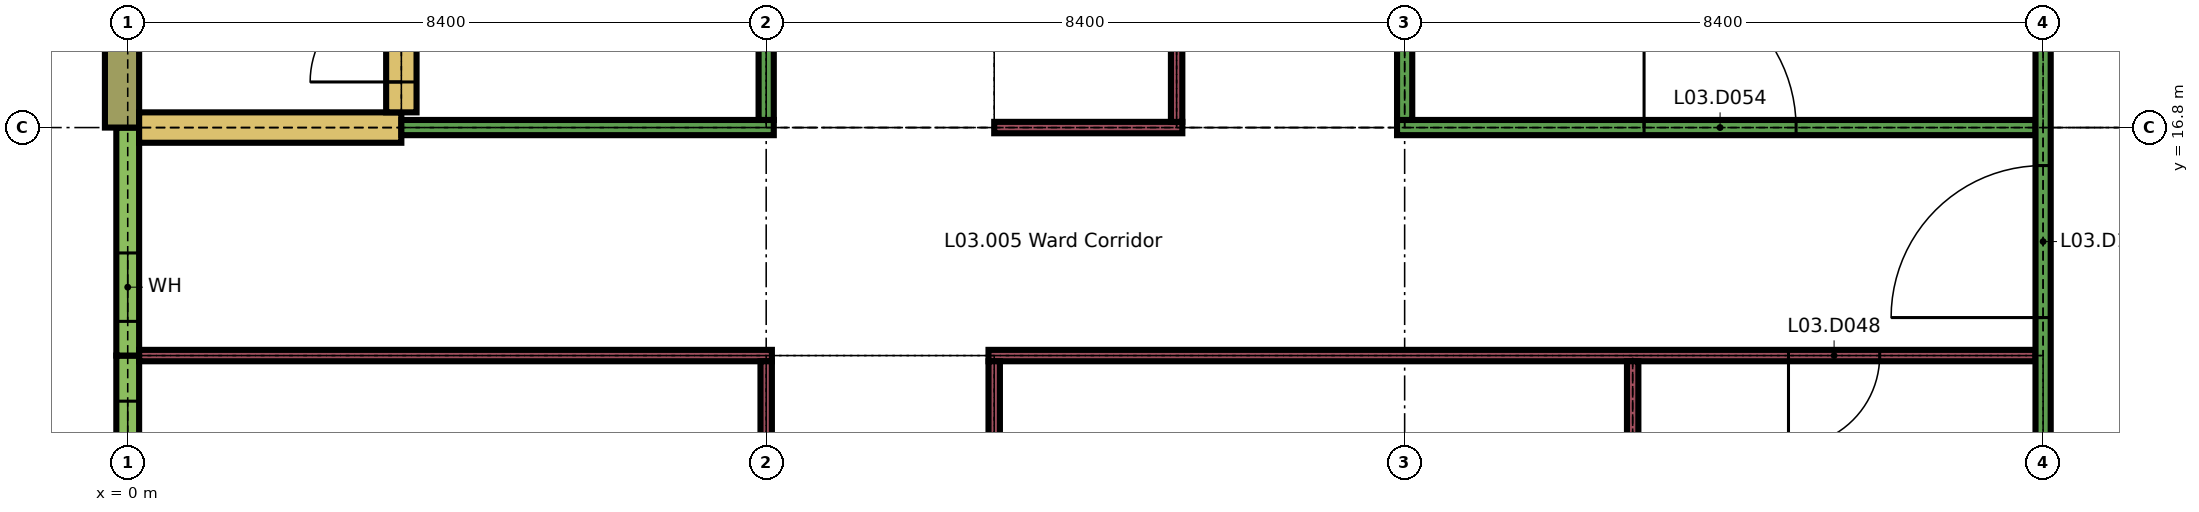
"""IFC4 building model, lengths in metres.
Left out: names, types, materials, properties, quantities, classifications, styles, units other than length and angle.
Written with IfcOpenShell. Run it as: python <this file> out.ifc"""

import sys

from ifc_helpers import new_model, si_unit, direction, frame, frame_2d, origin, place, context, subcontext, project, spatial, rectangle, extrude, element, fill, save


model = new_model("IFC4")
c1 = context("Model", 3, precision=1e-05, world=origin(), true_north=direction((0.0, 1.0)))
c2 = subcontext(c1, "Body", "Model", "MODEL_VIEW")
j1 = project(units=[si_unit("LENGTHUNIT", "METRE"), si_unit("PLANEANGLEUNIT", "RADIAN")], contexts=[c1])
p1 = place(None, origin())
s1 = spatial("IfcSite", under=j1, at=p1, CompositionType="ELEMENT")
p2 = place(p1, origin())
s2 = spatial("IfcBuilding", under=s1, at=p2, CompositionType="ELEMENT")
p3 = place(p2, frame((0.0, 0.0, 15.3)))
s3 = spatial("IfcBuildingStorey", under=s2, at=p3, CompositionType="ELEMENT", Elevation=15.3)
p4 = place(p3, frame((0.0, 11.4, 0.0), z_axis=(0.0, 0.0, 1.0), x_axis=(0.0, 1.0, 0.0)))
e1 = element("IfcWall", 1, at=p4, inside=s3, PredefinedType="SOLIDWALL", context=c2, shape_type="SweptSolid", body=[
    extrude(rectangle(XDim=2.4, YDim=0.3, at=frame_2d((1.2, 0.0))), origin(), (0.0, 0.0, 1.0), 2.96),
])
p5 = place(p4, frame((0.6, 0.0, 0.9)))
e2 = element("IfcOpeningElement", 2, at=p5, cuts=e1, PredefinedType="OPENING", context=c2, shape_type="SweptSolid", body=[
    extrude(rectangle(XDim=1.2, YDim=1.5, at=frame_2d((0.6, 0.75))), frame((0.0, 0.16, 0.0), z_axis=(0.0, -1.0, 0.0), x_axis=(1.0, 0.0, 0.0)), (0.0, 0.0, 1.0), 0.32),
])
p6 = place(p3, frame((0.0, 13.8, 0.0), z_axis=(0.0, 0.0, 1.0), x_axis=(0.0, 1.0, 0.0)))
e3 = element("IfcWall", 3, at=p6, inside=s3, PredefinedType="SOLIDWALL", context=c2, shape_type="SweptSolid", body=[
    extrude(rectangle(XDim=3.0, YDim=0.3, at=frame_2d((1.5, 0.0))), origin(), (0.0, 0.0, 1.0), 2.96),
])
p7 = place(p6, frame((0.45, 0.0, 0.9)))
e4 = element("IfcOpeningElement", 4, at=p7, cuts=e3, PredefinedType="OPENING", context=c2, shape_type="SweptSolid", body=[
    extrude(rectangle(XDim=0.9, YDim=1.5, at=frame_2d((0.45, 0.75))), frame((0.0, 0.16, 0.0), z_axis=(0.0, -1.0, 0.0), x_axis=(1.0, 0.0, 0.0)), (0.0, 0.0, 1.0), 0.32),
])
p8 = place(p3, frame((-0.075, 16.8, 0.0), z_axis=(0.0, 0.0, 1.0), x_axis=(0.0, 1.0, 0.0)))
e5 = element("IfcWall", 5, at=p8, inside=s3, PredefinedType="SOLIDWALL", context=c2, shape_type="SweptSolid", body=[
    extrude(rectangle(XDim=3.15, YDim=0.45, at=frame_2d((1.575, 0.0))), origin(), (0.0, 0.0, 1.0), 3.26),
])
p9 = place(p3, frame((0.15, 13.8, 0.0), z_axis=(0.0, 0.0, 1.0), x_axis=(1.0, 0.0, 0.0)))
e6 = element("IfcWall", 6, at=p9, inside=s3, PredefinedType="PARTITIONING", context=c2, shape_type="SweptSolid", body=[
    extrude(rectangle(XDim=8.325, YDim=0.15, at=frame_2d((4.163, 0.0))), origin(), (0.0, 0.0, 1.0), 3.26),
])
p10 = place(p3, frame((11.325, 13.8, 0.0), z_axis=(0.0, 0.0, 1.0), x_axis=(1.0, 0.0, 0.0)))
e7 = element("IfcWall", 7, at=p10, inside=s3, PredefinedType="PARTITIONING", context=c2, shape_type="SweptSolid", body=[
    extrude(rectangle(XDim=13.775, YDim=0.15, at=frame_2d((6.888, 0.0))), origin(), (0.0, 0.0, 1.0), 3.26),
])
p11 = place(p10, frame((10.525, 0.0, 0.0)))
e8 = element("IfcOpeningElement", 8, at=p11, cuts=e7, PredefinedType="OPENING", context=c2, shape_type="SweptSolid", body=[
    extrude(rectangle(XDim=1.2, YDim=2.1, at=frame_2d((0.6, 1.05))), frame((0.0, 0.085, 0.0), z_axis=(0.0, -1.0, 0.0), x_axis=(1.0, 0.0, 0.0)), (0.0, 0.0, 1.0), 0.17),
])
p12 = place(p3, frame((0.15, 16.8, 0.0), z_axis=(0.0, 0.0, 1.0), x_axis=(1.0, 0.0, 0.0)))
e9 = element("IfcWall", 9, at=p12, inside=s3, PredefinedType="SHEAR", context=c2, shape_type="SweptSolid", body=[
    extrude(rectangle(XDim=3.45, YDim=0.4, at=frame_2d((1.725, 0.0))), origin(), (0.0, 0.0, 1.0), 3.26),
])
p13 = place(p3, frame((3.6, 16.8, 0.0), z_axis=(0.0, 0.0, 1.0), x_axis=(1.0, 0.0, 0.0)))
e10 = element("IfcWall", 10, at=p13, inside=s3, PredefinedType="PARTITIONING", context=c2, shape_type="SweptSolid", body=[
    extrude(rectangle(XDim=4.9, YDim=0.2, at=frame_2d((2.45, 0.0))), origin(), (0.0, 0.0, 1.0), 3.26),
])
p14 = place(p3, frame((11.4, 16.8, 0.0), z_axis=(0.0, 0.0, 1.0), x_axis=(1.0, 0.0, 0.0)))
e11 = element("IfcWall", 11, at=p14, inside=s3, PredefinedType="PARTITIONING", context=c2, shape_type="SweptSolid", body=[
    extrude(rectangle(XDim=2.475, YDim=0.15, at=frame_2d((1.238, 0.0))), origin(), (0.0, 0.0, 1.0), 3.26),
])
p15 = place(p3, frame((16.7, 16.8, 0.0), z_axis=(0.0, 0.0, 1.0), x_axis=(1.0, 0.0, 0.0)))
e12 = element("IfcWall", 12, at=p15, inside=s3, PredefinedType="PARTITIONING", context=c2, shape_type="SweptSolid", body=[
    extrude(rectangle(XDim=8.4, YDim=0.2, at=frame_2d((4.2, 0.0))), origin(), (0.0, 0.0, 1.0), 3.26),
])
p16 = place(p15, frame((3.25, 0.0, 0.0)))
e13 = element("IfcOpeningElement", 13, at=p16, cuts=e12, PredefinedType="OPENING", context=c2, shape_type="SweptSolid", body=[
    extrude(rectangle(XDim=2.0, YDim=2.4, at=frame_2d((1.0, 1.2))), frame((0.0, 0.11, 0.0), z_axis=(0.0, -1.0, 0.0), x_axis=(1.0, 0.0, 0.0)), (0.0, 0.0, 1.0), 0.22),
])
p17 = place(p3, frame((3.6, 17.0, 0.0), z_axis=(0.0, 0.0, 1.0), x_axis=(0.0, 1.0, 0.0)))
e14 = element("IfcWall", 14, at=p17, inside=s3, PredefinedType="SHEAR", context=c2, shape_type="SweptSolid", body=[
    extrude(rectangle(XDim=8.0, YDim=0.4, at=frame_2d((4.0, 0.0))), origin(), (0.0, 0.0, 1.0), 3.26),
])
p18 = place(p17, frame((0.4, 0.0, 0.0)))
e15 = element("IfcOpeningElement", 15, at=p18, cuts=e14, PredefinedType="OPENING", context=c2, shape_type="SweptSolid", body=[
    extrude(rectangle(XDim=1.2, YDim=2.1, at=frame_2d((0.6, 1.05))), frame((0.0, 0.21, 0.0), z_axis=(0.0, -1.0, 0.0), x_axis=(1.0, 0.0, 0.0)), (0.0, 0.0, 1.0), 0.42),
])
p19 = place(p3, frame((8.4, 11.4, 0.0), z_axis=(0.0, 0.0, 1.0), x_axis=(0.0, 1.0, 0.0)))
e16 = element("IfcWall", 16, at=p19, inside=s3, PredefinedType="PARTITIONING", context=c2, shape_type="SweptSolid", body=[
    extrude(rectangle(XDim=2.325, YDim=0.15, at=frame_2d((1.163, 0.0))), origin(), (0.0, 0.0, 1.0), 3.26),
])
p20 = place(p3, frame((8.4, 16.9, 0.0), z_axis=(0.0, 0.0, 1.0), x_axis=(0.0, 1.0, 0.0)))
e17 = element("IfcWall", 17, at=p20, inside=s3, PredefinedType="PARTITIONING", context=c2, shape_type="SweptSolid", body=[
    extrude(rectangle(XDim=8.2, YDim=0.2, at=frame_2d((4.1, 0.0))), origin(), (0.0, 0.0, 1.0), 3.26),
])
p21 = place(p20, frame((3.1, 0.0, 0.0)))
e18 = element("IfcOpeningElement", 18, at=p21, cuts=e17, PredefinedType="OPENING", context=c2, shape_type="SweptSolid", body=[
    extrude(rectangle(XDim=2.0, YDim=2.4, at=frame_2d((1.0, 1.2))), frame((0.0, 0.11, 0.0), z_axis=(0.0, -1.0, 0.0), x_axis=(1.0, 0.0, 0.0)), (0.0, 0.0, 1.0), 0.22),
])
p22 = place(p3, frame((11.4, 11.4, 0.0), z_axis=(0.0, 0.0, 1.0), x_axis=(0.0, 1.0, 0.0)))
e19 = element("IfcWall", 19, at=p22, inside=s3, PredefinedType="PARTITIONING", context=c2, shape_type="SweptSolid", body=[
    extrude(rectangle(XDim=2.325, YDim=0.15, at=frame_2d((1.163, 0.0))), origin(), (0.0, 0.0, 1.0), 3.26),
])
p23 = place(p3, frame((13.8, 16.875, 0.0), z_axis=(0.0, 0.0, 1.0), x_axis=(0.0, 1.0, 0.0)))
e20 = element("IfcWall", 20, at=p23, inside=s3, PredefinedType="PARTITIONING", context=c2, shape_type="SweptSolid", body=[
    extrude(rectangle(XDim=8.225, YDim=0.15, at=frame_2d((4.113, 0.0))), origin(), (0.0, 0.0, 1.0), 3.26),
])
p24 = place(p3, frame((16.8, 16.9, 0.0), z_axis=(0.0, 0.0, 1.0), x_axis=(0.0, 1.0, 0.0)))
e21 = element("IfcWall", 21, at=p24, inside=s3, PredefinedType="PARTITIONING", context=c2, shape_type="SweptSolid", body=[
    extrude(rectangle(XDim=4.7, YDim=0.2, at=frame_2d((2.35, 0.0))), origin(), (0.0, 0.0, 1.0), 3.26),
])
p25 = place(p3, frame((19.8, 11.475, 0.0), z_axis=(0.0, 0.0, 1.0), x_axis=(0.0, 1.0, 0.0)))
e22 = element("IfcWall", 22, at=p25, inside=s3, PredefinedType="PARTITIONING", context=c2, shape_type="SweptSolid", body=[
    extrude(rectangle(XDim=2.25, YDim=0.15, at=frame_2d((1.125, 0.0))), origin(), (0.0, 0.0, 1.0), 3.26),
])
p26 = place(p3, frame((25.2, 8.75, 0.0), z_axis=(0.0, 0.0, 1.0), x_axis=(0.0, 1.0, 0.0)))
e23 = element("IfcWall", 23, at=p26, inside=s3, PredefinedType="PARTITIONING", context=c2, shape_type="SweptSolid", body=[
    extrude(rectangle(XDim=12.85, YDim=0.2, at=frame_2d((6.425, 0.0))), origin(), (0.0, 0.0, 1.0), 3.26),
])
p27 = place(p26, frame((0.325, 0.0, 0.0)))
e24 = element("IfcOpeningElement", 24, at=p27, cuts=e23, PredefinedType="OPENING", context=c2, shape_type="SweptSolid", body=[
    extrude(rectangle(XDim=2.0, YDim=2.4, at=frame_2d((1.0, 1.2))), frame((0.0, 0.11, 0.0), z_axis=(0.0, -1.0, 0.0), x_axis=(1.0, 0.0, 0.0)), (0.0, 0.0, 1.0), 0.22),
])
p28 = place(p26, frame((5.55, 0.0, 0.0)))
e25 = element("IfcOpeningElement", 25, at=p28, cuts=e23, PredefinedType="OPENING", context=c2, shape_type="SweptSolid", body=[
    extrude(rectangle(XDim=2.0, YDim=2.4, at=frame_2d((1.0, 1.2))), frame((0.0, 0.11, 0.0), z_axis=(0.0, -1.0, 0.0), x_axis=(1.0, 0.0, 0.0)), (0.0, 0.0, 1.0), 0.22),
])
p29 = place(p5, origin())
e26 = element("IfcWindow", 26, at=p29, inside=s3, PartitioningType="SINGLE_PANEL", PredefinedType="WINDOW", context=c2, shape_type="SweptSolid", body=[
    extrude(rectangle(XDim=1.2, YDim=1.5, at=frame_2d((0.6, 0.75))), frame((0.0, 0.03, 0.0), z_axis=(0.0, -1.0, 0.0), x_axis=(1.0, 0.0, 0.0)), (0.0, 0.0, 1.0), 0.06),
])
fill(e2, e26)
p30 = place(p7, origin())
e27 = element("IfcWindow", 27, at=p30, inside=s3, PartitioningType="SINGLE_PANEL", PredefinedType="WINDOW", context=c2, shape_type="SweptSolid", body=[
    extrude(rectangle(XDim=0.9, YDim=1.5, at=frame_2d((0.45, 0.75))), frame((0.0, 0.03, 0.0), z_axis=(0.0, -1.0, 0.0), x_axis=(1.0, 0.0, 0.0)), (0.0, 0.0, 1.0), 0.06),
])
fill(e4, e27)
p31 = place(p11, origin())
e28 = element("IfcDoor", 28, at=p31, inside=s3, OperationType="SINGLE_SWING_LEFT", PredefinedType="DOOR", context=c2, shape_type="SweptSolid", body=[
    extrude(rectangle(XDim=1.2, YDim=2.1, at=frame_2d((0.6, 1.05))), frame((0.0, 0.025, 0.0), z_axis=(0.0, -1.0, 0.0), x_axis=(1.0, 0.0, 0.0)), (0.0, 0.0, 1.0), 0.05),
])
fill(e8, e28)
p32 = place(p16, origin())
e29 = element("IfcDoor", 29, at=p32, inside=s3, OperationType="SINGLE_SWING_RIGHT", PredefinedType="DOOR", context=c2, shape_type="SweptSolid", body=[
    extrude(rectangle(XDim=2.0, YDim=2.4, at=frame_2d((1.0, 1.2))), frame((0.0, 0.03, 0.0), z_axis=(0.0, -1.0, 0.0), x_axis=(1.0, 0.0, 0.0)), (0.0, 0.0, 1.0), 0.06),
])
fill(e13, e29)
p33 = place(p18, origin())
e30 = element("IfcDoor", 30, at=p33, inside=s3, OperationType="SINGLE_SWING_RIGHT", PredefinedType="DOOR", context=c2, shape_type="SweptSolid", body=[
    extrude(rectangle(XDim=1.2, YDim=2.1, at=frame_2d((0.6, 1.05))), frame((0.0, 0.025, 0.0), z_axis=(0.0, -1.0, 0.0), x_axis=(1.0, 0.0, 0.0)), (0.0, 0.0, 1.0), 0.05),
])
fill(e15, e30)
p34 = place(p28, origin())
e31 = element("IfcDoor", 31, at=p34, inside=s3, OperationType="SINGLE_SWING_RIGHT", PredefinedType="DOOR", context=c2, shape_type="SweptSolid", body=[
    extrude(rectangle(XDim=2.0, YDim=2.4, at=frame_2d((1.0, 1.2))), frame((0.0, 0.03, 0.0), z_axis=(0.0, -1.0, 0.0), x_axis=(1.0, 0.0, 0.0)), (0.0, 0.0, 1.0), 0.06),
])
fill(e25, e31)
save(model, sys.argv[1])
